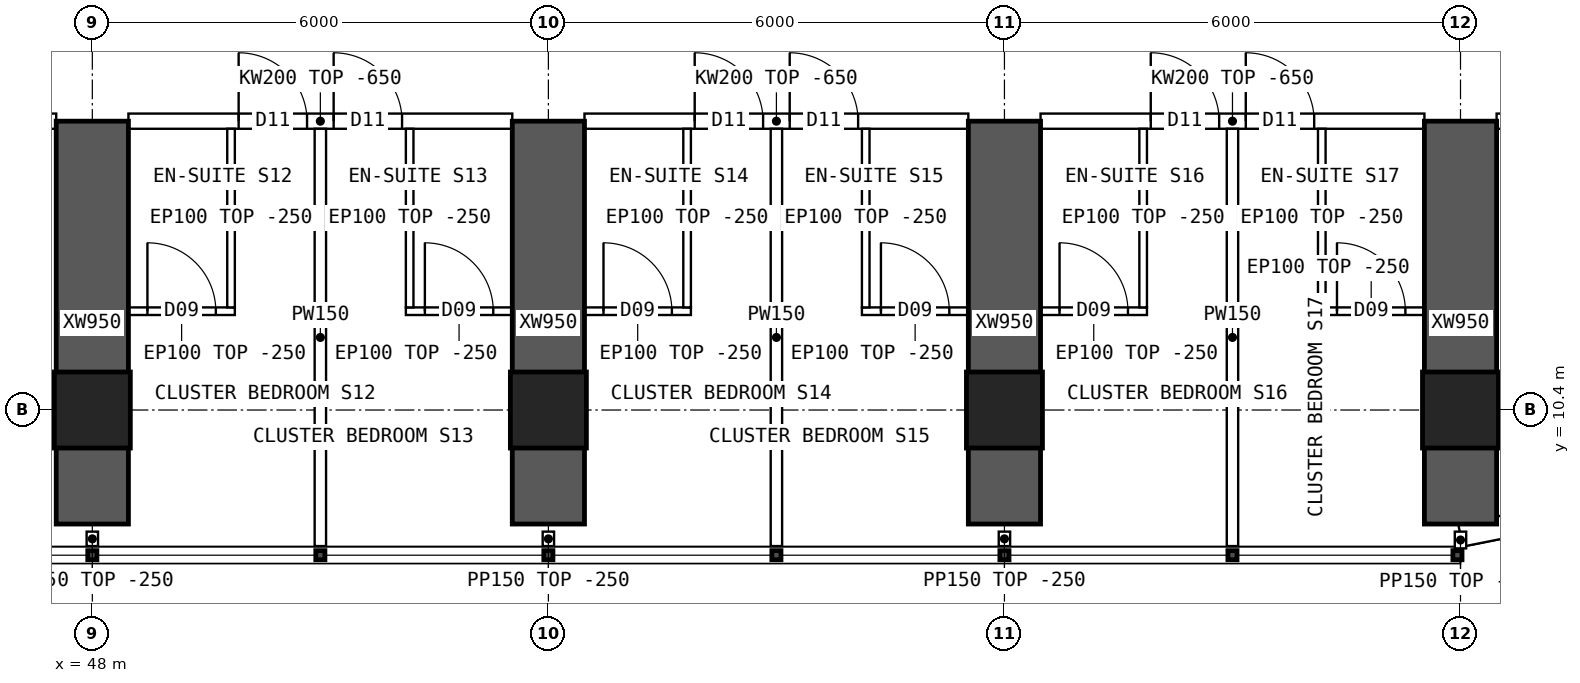
"""IFC4 building model, lengths in metres.
Left out: names, types, materials, properties, quantities, classifications, styles, units other than length and angle.
Written with IfcOpenShell. Run it as: python <this file> out.ifc"""

import sys

from ifc_helpers import new_model, si_unit, direction, frame, frame_2d, origin, origin_2d, place, context, subcontext, project, spatial, polyline, rectangle, hollow_rectangle, outline, extrude, element, fill, save


model = new_model("IFC4")
c1 = context("Model", 3, precision=1e-05, world=origin(), true_north=direction((0.0, 1.0)))
c2 = subcontext(c1, "Body", "Model", "MODEL_VIEW")
j1 = project(units=[si_unit("LENGTHUNIT", "METRE"), si_unit("PLANEANGLEUNIT", "RADIAN")], contexts=[c1])
p1 = place(None, origin())
s1 = spatial("IfcSite", under=j1, at=p1, CompositionType="ELEMENT")
p2 = place(p1, origin())
s2 = spatial("IfcBuilding", under=s1, at=p2, CompositionType="ELEMENT")
p3 = place(p2, frame((0.0, 0.0, 88.15)))
s3 = spatial("IfcBuildingStorey", under=s2, at=p3, CompositionType="ELEMENT", Elevation=88.15)
for number, where, z_axis, x_axis in (
    (1, (48.0, 10.4, 0.0), (0.0, 0.0, 1.0), (1.0, 0.0, 0.0)),
    (2, (54.0, 10.4, 0.0), (0.0, 0.0, 1.0), (1.0, 0.0, 0.0)),
    (3, (60.0, 10.4, 0.0), (0.0, 0.0, 1.0), (1.0, 0.0, 0.0)),
    (4, (66.0, 10.4, 0.0), (0.0, 0.0, 1.0), (1.0, 0.0, 0.0)),
):
    element("IfcColumn", number, at=place(p3, frame(where, z_axis=z_axis, x_axis=x_axis)), inside=s3, PredefinedType="COLUMN", context=c2, shape_type="SweptSolid", body=[
        extrude(hollow_rectangle(XDim=1.0, YDim=1.0, WallThickness=0.1, at=origin_2d()), origin(), (0.0, 0.0, 1.0), 3.75),
    ])
for number, where, z_axis, x_axis in (
    (5, (48.0, 8.9, 0.0), (0.0, 0.0, 1.0), (0.0, 1.0, 0.0)),
    (6, (54.0, 8.9, 0.0), (0.0, 0.0, 1.0), (0.0, 1.0, 0.0)),
    (7, (60.0, 8.9, 0.0), (0.0, 0.0, 1.0), (0.0, 1.0, 0.0)),
    (8, (66.0, 8.9, 0.0), (0.0, 0.0, 1.0), (0.0, 1.0, 0.0)),
):
    element("IfcWall", number, at=place(p3, frame(where, z_axis=z_axis, x_axis=x_axis)), inside=s3, PredefinedType="SHEAR", context=c2, shape_type="SweptSolid", body=[
        extrude(rectangle(XDim=5.3, YDim=0.95, at=frame_2d((2.65, 0.0))), origin(), (0.0, 0.0, 1.0), 3.75),
    ])
p4 = place(p3, frame((66.0, 8.75, 0.0), z_axis=(0.0, 0.0, 1.0), x_axis=(0.980791473772, 0.195059183267, 0.0)))
e9 = element("IfcWall", 9, at=p4, inside=s3, PredefinedType="SOLIDWALL", context=c2, shape_type="SweptSolid", body=[
    extrude(outline(polyline([(-0.03, -0.15), (3.717, -0.15), (3.657, 0.15), (0.03, 0.15), (-0.03, -0.15)])), origin(), (0.0, 0.0, 1.0), 3.5),
])
p5 = place(p4, frame((1.144, 0.0, 0.9)))
e10 = element("IfcOpeningElement", 10, at=p5, cuts=e9, PredefinedType="OPENING", context=c2, shape_type="SweptSolid", body=[
    extrude(rectangle(XDim=1.4, YDim=1.8, at=frame_2d((0.7, 0.9))), frame((0.0, 0.16, 0.0), z_axis=(0.0, -1.0, 0.0), x_axis=(1.0, 0.0, 0.0)), (0.0, 0.0, 1.0), 0.32),
])
p6 = place(p3, frame((42.475, 14.2, 0.0), z_axis=(0.0, 0.0, 1.0), x_axis=(1.0, 0.0, 0.0)))
e11 = element("IfcWall", 11, at=p6, inside=s3, PredefinedType="SOLIDWALL", context=c2, shape_type="SweptSolid", body=[
    extrude(outline(polyline([(0.0, 0.0), (5.05, 0.0), (5.05, 3.1), (0.0, 3.1), (0.0, 0.0)])), frame((0.0, 0.1, 0.0), z_axis=(0.0, -1.0, 0.0), x_axis=(1.0, 0.0, 0.0)), (0.0, 0.0, 1.0), 0.2),
])
p7 = place(p6, frame((0.6, 0.0, 0.0)))
e12 = element("IfcOpeningElement", 12, at=p7, cuts=e11, PredefinedType="OPENING", context=c2, shape_type="SweptSolid", body=[
    extrude(rectangle(XDim=1.0, YDim=2.1, at=frame_2d((0.5, 1.05))), frame((0.0, 0.11, 0.0), z_axis=(0.0, -1.0, 0.0), x_axis=(1.0, 0.0, 0.0)), (0.0, 0.0, 1.0), 0.22),
])
p8 = place(p3, frame((48.475, 14.2, 0.0), z_axis=(0.0, 0.0, 1.0), x_axis=(1.0, 0.0, 0.0)))
e13 = element("IfcWall", 13, at=p8, inside=s3, PredefinedType="SOLIDWALL", context=c2, shape_type="SweptSolid", body=[
    extrude(outline(polyline([(0.0, 0.0), (5.05, 0.0), (5.05, 3.1), (0.0, 3.1), (0.0, 0.0)])), frame((0.0, 0.1, 0.0), z_axis=(0.0, -1.0, 0.0), x_axis=(1.0, 0.0, 0.0)), (0.0, 0.0, 1.0), 0.2),
])
p9 = place(p8, frame((1.45, 0.0, 0.0)))
e14 = element("IfcOpeningElement", 14, at=p9, cuts=e13, PredefinedType="OPENING", context=c2, shape_type="SweptSolid", body=[
    extrude(rectangle(XDim=0.9, YDim=2.1, at=frame_2d((0.45, 1.05))), frame((0.0, 0.11, 0.0), z_axis=(0.0, -1.0, 0.0), x_axis=(1.0, 0.0, 0.0)), (0.0, 0.0, 1.0), 0.22),
])
p10 = place(p8, frame((2.7, 0.0, 0.0)))
e15 = element("IfcOpeningElement", 15, at=p10, cuts=e13, PredefinedType="OPENING", context=c2, shape_type="SweptSolid", body=[
    extrude(rectangle(XDim=0.9, YDim=2.1, at=frame_2d((0.45, 1.05))), frame((0.0, 0.11, 0.0), z_axis=(0.0, -1.0, 0.0), x_axis=(1.0, 0.0, 0.0)), (0.0, 0.0, 1.0), 0.22),
])
p11 = place(p3, frame((54.475, 14.2, 0.0), z_axis=(0.0, 0.0, 1.0), x_axis=(1.0, 0.0, 0.0)))
e16 = element("IfcWall", 16, at=p11, inside=s3, PredefinedType="SOLIDWALL", context=c2, shape_type="SweptSolid", body=[
    extrude(outline(polyline([(0.0, 0.0), (5.05, 0.0), (5.05, 3.1), (0.0, 3.1), (0.0, 0.0)])), frame((0.0, 0.1, 0.0), z_axis=(0.0, -1.0, 0.0), x_axis=(1.0, 0.0, 0.0)), (0.0, 0.0, 1.0), 0.2),
])
p12 = place(p11, frame((1.45, 0.0, 0.0)))
e17 = element("IfcOpeningElement", 17, at=p12, cuts=e16, PredefinedType="OPENING", context=c2, shape_type="SweptSolid", body=[
    extrude(rectangle(XDim=0.9, YDim=2.1, at=frame_2d((0.45, 1.05))), frame((0.0, 0.11, 0.0), z_axis=(0.0, -1.0, 0.0), x_axis=(1.0, 0.0, 0.0)), (0.0, 0.0, 1.0), 0.22),
])
p13 = place(p11, frame((2.7, 0.0, 0.0)))
e18 = element("IfcOpeningElement", 18, at=p13, cuts=e16, PredefinedType="OPENING", context=c2, shape_type="SweptSolid", body=[
    extrude(rectangle(XDim=0.9, YDim=2.1, at=frame_2d((0.45, 1.05))), frame((0.0, 0.11, 0.0), z_axis=(0.0, -1.0, 0.0), x_axis=(1.0, 0.0, 0.0)), (0.0, 0.0, 1.0), 0.22),
])
p14 = place(p3, frame((60.475, 14.2, 0.0), z_axis=(0.0, 0.0, 1.0), x_axis=(1.0, 0.0, 0.0)))
e19 = element("IfcWall", 19, at=p14, inside=s3, PredefinedType="SOLIDWALL", context=c2, shape_type="SweptSolid", body=[
    extrude(outline(polyline([(0.0, 0.0), (5.05, 0.0), (5.05, 3.1), (0.0, 3.1), (0.0, 0.0)])), frame((0.0, 0.1, 0.0), z_axis=(0.0, -1.0, 0.0), x_axis=(1.0, 0.0, 0.0)), (0.0, 0.0, 1.0), 0.2),
])
p15 = place(p14, frame((1.45, 0.0, 0.0)))
e20 = element("IfcOpeningElement", 20, at=p15, cuts=e19, PredefinedType="OPENING", context=c2, shape_type="SweptSolid", body=[
    extrude(rectangle(XDim=0.9, YDim=2.1, at=frame_2d((0.45, 1.05))), frame((0.0, 0.11, 0.0), z_axis=(0.0, -1.0, 0.0), x_axis=(1.0, 0.0, 0.0)), (0.0, 0.0, 1.0), 0.22),
])
p16 = place(p14, frame((2.7, 0.0, 0.0)))
e21 = element("IfcOpeningElement", 21, at=p16, cuts=e19, PredefinedType="OPENING", context=c2, shape_type="SweptSolid", body=[
    extrude(rectangle(XDim=0.9, YDim=2.1, at=frame_2d((0.45, 1.05))), frame((0.0, 0.11, 0.0), z_axis=(0.0, -1.0, 0.0), x_axis=(1.0, 0.0, 0.0)), (0.0, 0.0, 1.0), 0.22),
])
p17 = place(p3, frame((66.475, 14.2, 0.0), z_axis=(0.0, 0.0, 1.0), x_axis=(1.0, 0.0, 0.0)))
e22 = element("IfcWall", 22, at=p17, inside=s3, PredefinedType="SOLIDWALL", context=c2, shape_type="SweptSolid", body=[
    extrude(rectangle(XDim=1.925, YDim=0.2, at=frame_2d((0.962, 0.0))), origin(), (0.0, 0.0, 1.0), 3.5),
])
p18 = place(p17, frame((0.2, 0.0, 0.0)))
e23 = element("IfcOpeningElement", 23, at=p18, cuts=e22, PredefinedType="OPENING", context=c2, shape_type="SweptSolid", body=[
    extrude(rectangle(XDim=0.9, YDim=2.1, at=frame_2d((0.45, 1.05))), frame((0.0, 0.11, 0.0), z_axis=(0.0, -1.0, 0.0), x_axis=(1.0, 0.0, 0.0)), (0.0, 0.0, 1.0), 0.22),
])
p19 = place(p3, frame((51.0, 8.61, 0.0), z_axis=(0.0, 0.0, 1.0), x_axis=(0.0, 1.0, 0.0)))
e24 = element("IfcWall", 24, at=p19, inside=s3, PredefinedType="PARTITIONING", context=c2, shape_type="SweptSolid", body=[
    extrude(outline(polyline([(0.0, 0.0), (5.49, 0.0), (5.49, 3.1), (5.442, 3.1), (5.44, 3.5), (1.992, 3.5), (1.99, 3.1), (1.592, 3.1), (1.59, 3.5), (0.0, 3.5), (0.0, 0.0)])), frame((0.0, 0.075, 0.0), z_axis=(0.0, -1.0, 0.0), x_axis=(1.0, 0.0, 0.0)), (0.0, 0.0, 1.0), 0.15),
])
p20 = place(p3, frame((49.875, 11.7, 0.0), z_axis=(0.0, 0.0, 1.0), x_axis=(-1.0, 0.0, 0.0)))
e25 = element("IfcWall", 25, at=p20, inside=s3, PredefinedType="PARTITIONING", context=c2, shape_type="SweptSolid", body=[
    extrude(rectangle(XDim=1.4, YDim=0.1, at=frame_2d((0.7, 0.0))), origin(), (0.0, 0.0, 1.0), 3.5),
])
p21 = place(p20, frame((0.25, 0.0, 0.0)))
e26 = element("IfcOpeningElement", 26, at=p21, cuts=e25, PredefinedType="OPENING", context=c2, shape_type="SweptSolid", body=[
    extrude(rectangle(XDim=0.9, YDim=2.1, at=frame_2d((0.45, 1.05))), frame((0.0, 0.06, 0.0), z_axis=(0.0, -1.0, 0.0), x_axis=(1.0, 0.0, 0.0)), (0.0, 0.0, 1.0), 0.12),
])
p22 = place(p3, frame((49.825, 11.75, 0.0), z_axis=(0.0, 0.0, 1.0), x_axis=(0.0, 1.0, 0.0)))
e27 = element("IfcWall", 27, at=p22, inside=s3, PredefinedType="PARTITIONING", context=c2, shape_type="SweptSolid", body=[
    extrude(outline(polyline([(0.0, 0.0), (2.35, 0.0), (2.35, 3.1), (2.302, 3.1), (2.3, 3.5), (0.0, 3.5), (0.0, 0.0)])), frame((0.0, 0.05, 0.0), z_axis=(0.0, -1.0, 0.0), x_axis=(1.0, 0.0, 0.0)), (0.0, 0.0, 1.0), 0.1),
])
p23 = place(p3, frame((53.525, 11.7, 0.0), z_axis=(0.0, 0.0, 1.0), x_axis=(-1.0, 0.0, 0.0)))
e28 = element("IfcWall", 28, at=p23, inside=s3, PredefinedType="PARTITIONING", context=c2, shape_type="SweptSolid", body=[
    extrude(rectangle(XDim=1.4, YDim=0.1, at=frame_2d((0.7, 0.0))), origin(), (0.0, 0.0, 1.0), 3.5),
])
p24 = place(p23, frame((0.25, 0.0, 0.0)))
e29 = element("IfcOpeningElement", 29, at=p24, cuts=e28, PredefinedType="OPENING", context=c2, shape_type="SweptSolid", body=[
    extrude(rectangle(XDim=0.9, YDim=2.1, at=frame_2d((0.45, 1.05))), frame((0.0, 0.06, 0.0), z_axis=(0.0, -1.0, 0.0), x_axis=(1.0, 0.0, 0.0)), (0.0, 0.0, 1.0), 0.12),
])
p25 = place(p3, frame((52.175, 11.75, 0.0), z_axis=(0.0, 0.0, 1.0), x_axis=(0.0, 1.0, 0.0)))
e30 = element("IfcWall", 30, at=p25, inside=s3, PredefinedType="PARTITIONING", context=c2, shape_type="SweptSolid", body=[
    extrude(outline(polyline([(0.0, 0.0), (2.35, 0.0), (2.35, 3.1), (2.302, 3.1), (2.3, 3.5), (0.0, 3.5), (0.0, 0.0)])), frame((0.0, 0.05, 0.0), z_axis=(0.0, -1.0, 0.0), x_axis=(1.0, 0.0, 0.0)), (0.0, 0.0, 1.0), 0.1),
])
p26 = place(p3, frame((57.0, 8.61, 0.0), z_axis=(0.0, 0.0, 1.0), x_axis=(0.0, 1.0, 0.0)))
e31 = element("IfcWall", 31, at=p26, inside=s3, PredefinedType="PARTITIONING", context=c2, shape_type="SweptSolid", body=[
    extrude(outline(polyline([(0.0, 0.0), (5.49, 0.0), (5.49, 3.1), (5.442, 3.1), (5.44, 3.5), (1.992, 3.5), (1.99, 3.1), (1.592, 3.1), (1.59, 3.5), (0.0, 3.5), (0.0, 0.0)])), frame((0.0, 0.075, 0.0), z_axis=(0.0, -1.0, 0.0), x_axis=(1.0, 0.0, 0.0)), (0.0, 0.0, 1.0), 0.15),
])
p27 = place(p3, frame((55.875, 11.7, 0.0), z_axis=(0.0, 0.0, 1.0), x_axis=(-1.0, 0.0, 0.0)))
e32 = element("IfcWall", 32, at=p27, inside=s3, PredefinedType="PARTITIONING", context=c2, shape_type="SweptSolid", body=[
    extrude(rectangle(XDim=1.4, YDim=0.1, at=frame_2d((0.7, 0.0))), origin(), (0.0, 0.0, 1.0), 3.5),
])
p28 = place(p27, frame((0.25, 0.0, 0.0)))
e33 = element("IfcOpeningElement", 33, at=p28, cuts=e32, PredefinedType="OPENING", context=c2, shape_type="SweptSolid", body=[
    extrude(rectangle(XDim=0.9, YDim=2.1, at=frame_2d((0.45, 1.05))), frame((0.0, 0.06, 0.0), z_axis=(0.0, -1.0, 0.0), x_axis=(1.0, 0.0, 0.0)), (0.0, 0.0, 1.0), 0.12),
])
p29 = place(p3, frame((55.825, 11.75, 0.0), z_axis=(0.0, 0.0, 1.0), x_axis=(0.0, 1.0, 0.0)))
e34 = element("IfcWall", 34, at=p29, inside=s3, PredefinedType="PARTITIONING", context=c2, shape_type="SweptSolid", body=[
    extrude(outline(polyline([(0.0, 0.0), (2.35, 0.0), (2.35, 3.1), (2.302, 3.1), (2.3, 3.5), (0.0, 3.5), (0.0, 0.0)])), frame((0.0, 0.05, 0.0), z_axis=(0.0, -1.0, 0.0), x_axis=(1.0, 0.0, 0.0)), (0.0, 0.0, 1.0), 0.1),
])
p30 = place(p3, frame((59.525, 11.7, 0.0), z_axis=(0.0, 0.0, 1.0), x_axis=(-1.0, 0.0, 0.0)))
e35 = element("IfcWall", 35, at=p30, inside=s3, PredefinedType="PARTITIONING", context=c2, shape_type="SweptSolid", body=[
    extrude(rectangle(XDim=1.4, YDim=0.1, at=frame_2d((0.7, 0.0))), origin(), (0.0, 0.0, 1.0), 3.5),
])
p31 = place(p30, frame((0.25, 0.0, 0.0)))
e36 = element("IfcOpeningElement", 36, at=p31, cuts=e35, PredefinedType="OPENING", context=c2, shape_type="SweptSolid", body=[
    extrude(rectangle(XDim=0.9, YDim=2.1, at=frame_2d((0.45, 1.05))), frame((0.0, 0.06, 0.0), z_axis=(0.0, -1.0, 0.0), x_axis=(1.0, 0.0, 0.0)), (0.0, 0.0, 1.0), 0.12),
])
p32 = place(p3, frame((58.175, 11.75, 0.0), z_axis=(0.0, 0.0, 1.0), x_axis=(0.0, 1.0, 0.0)))
e37 = element("IfcWall", 37, at=p32, inside=s3, PredefinedType="PARTITIONING", context=c2, shape_type="SweptSolid", body=[
    extrude(outline(polyline([(0.0, 0.0), (2.35, 0.0), (2.35, 3.1), (2.302, 3.1), (2.3, 3.5), (0.0, 3.5), (0.0, 0.0)])), frame((0.0, 0.05, 0.0), z_axis=(0.0, -1.0, 0.0), x_axis=(1.0, 0.0, 0.0)), (0.0, 0.0, 1.0), 0.1),
])
p33 = place(p3, frame((63.0, 8.61, 0.0), z_axis=(0.0, 0.0, 1.0), x_axis=(0.0, 1.0, 0.0)))
e38 = element("IfcWall", 38, at=p33, inside=s3, PredefinedType="PARTITIONING", context=c2, shape_type="SweptSolid", body=[
    extrude(outline(polyline([(0.0, 0.0), (5.49, 0.0), (5.49, 3.1), (5.442, 3.1), (5.44, 3.5), (1.992, 3.5), (1.99, 3.1), (1.592, 3.1), (1.59, 3.5), (0.0, 3.5), (0.0, 0.0)])), frame((0.0, 0.075, 0.0), z_axis=(0.0, -1.0, 0.0), x_axis=(1.0, 0.0, 0.0)), (0.0, 0.0, 1.0), 0.15),
])
p34 = place(p3, frame((61.875, 11.7, 0.0), z_axis=(0.0, 0.0, 1.0), x_axis=(-1.0, 0.0, 0.0)))
e39 = element("IfcWall", 39, at=p34, inside=s3, PredefinedType="PARTITIONING", context=c2, shape_type="SweptSolid", body=[
    extrude(rectangle(XDim=1.4, YDim=0.1, at=frame_2d((0.7, 0.0))), origin(), (0.0, 0.0, 1.0), 3.5),
])
p35 = place(p34, frame((0.25, 0.0, 0.0)))
e40 = element("IfcOpeningElement", 40, at=p35, cuts=e39, PredefinedType="OPENING", context=c2, shape_type="SweptSolid", body=[
    extrude(rectangle(XDim=0.9, YDim=2.1, at=frame_2d((0.45, 1.05))), frame((0.0, 0.06, 0.0), z_axis=(0.0, -1.0, 0.0), x_axis=(1.0, 0.0, 0.0)), (0.0, 0.0, 1.0), 0.12),
])
p36 = place(p3, frame((61.825, 11.75, 0.0), z_axis=(0.0, 0.0, 1.0), x_axis=(0.0, 1.0, 0.0)))
e41 = element("IfcWall", 41, at=p36, inside=s3, PredefinedType="PARTITIONING", context=c2, shape_type="SweptSolid", body=[
    extrude(outline(polyline([(0.0, 0.0), (2.35, 0.0), (2.35, 3.1), (2.302, 3.1), (2.3, 3.5), (0.0, 3.5), (0.0, 0.0)])), frame((0.0, 0.05, 0.0), z_axis=(0.0, -1.0, 0.0), x_axis=(1.0, 0.0, 0.0)), (0.0, 0.0, 1.0), 0.1),
])
p37 = place(p3, frame((65.525, 11.7, 0.0), z_axis=(0.0, 0.0, 1.0), x_axis=(-1.0, 0.0, 0.0)))
e42 = element("IfcWall", 42, at=p37, inside=s3, PredefinedType="PARTITIONING", context=c2, shape_type="SweptSolid", body=[
    extrude(rectangle(XDim=1.4, YDim=0.1, at=frame_2d((0.7, 0.0))), origin(), (0.0, 0.0, 1.0), 3.5),
])
p38 = place(p37, frame((0.25, 0.0, 0.0)))
e43 = element("IfcOpeningElement", 43, at=p38, cuts=e42, PredefinedType="OPENING", context=c2, shape_type="SweptSolid", body=[
    extrude(rectangle(XDim=0.9, YDim=2.1, at=frame_2d((0.45, 1.05))), frame((0.0, 0.06, 0.0), z_axis=(0.0, -1.0, 0.0), x_axis=(1.0, 0.0, 0.0)), (0.0, 0.0, 1.0), 0.12),
])
p39 = place(p3, frame((64.175, 11.75, 0.0), z_axis=(0.0, 0.0, 1.0), x_axis=(0.0, 1.0, 0.0)))
e44 = element("IfcWall", 44, at=p39, inside=s3, PredefinedType="PARTITIONING", context=c2, shape_type="SweptSolid", body=[
    extrude(outline(polyline([(0.0, 0.0), (2.35, 0.0), (2.35, 3.1), (2.302, 3.1), (2.3, 3.5), (0.0, 3.5), (0.0, 0.0)])), frame((0.0, 0.05, 0.0), z_axis=(0.0, -1.0, 0.0), x_axis=(1.0, 0.0, 0.0)), (0.0, 0.0, 1.0), 0.1),
])
for number, where, z_axis, x_axis in (
    (45, (48.0, 8.8, 0.0), (0.0, 0.0, 1.0), (0.0, -1.0, 0.0)),
    (46, (54.0, 8.8, 0.0), (0.0, 0.0, 1.0), (0.0, -1.0, 0.0)),
    (47, (60.0, 8.8, 0.0), (0.0, 0.0, 1.0), (0.0, -1.0, 0.0)),
):
    element("IfcWall", number, at=place(p3, frame(where, z_axis=z_axis, x_axis=x_axis)), inside=s3, PredefinedType="PARTITIONING", context=c2, shape_type="SweptSolid", body=[
        extrude(rectangle(XDim=0.19, YDim=0.15, at=frame_2d((0.095, 0.0))), origin(), (0.0, 0.0, 1.0), 3.5),
    ])
p40 = place(p3, frame((66.0, 8.8, 0.0), z_axis=(0.0, 0.0, 1.0), x_axis=(0.0, -1.0, 0.0)))
e48 = element("IfcWall", 48, at=p40, inside=s3, PredefinedType="PARTITIONING", context=c2, shape_type="SweptSolid", body=[
    extrude(rectangle(XDim=0.22, YDim=0.15, at=frame_2d((0.11, 0.0))), origin(), (0.0, 0.0, 1.0), 3.5),
])
p41 = place(p21, origin())
e49 = element("IfcDoor", 49, at=p41, inside=s3, OperationType="SINGLE_SWING_RIGHT", PredefinedType="DOOR", context=c2, shape_type="SweptSolid", body=[
    extrude(rectangle(XDim=0.9, YDim=2.1, at=frame_2d((0.45, 1.05))), frame((0.0, 0.025, 0.0), z_axis=(0.0, -1.0, 0.0), x_axis=(1.0, 0.0, 0.0)), (0.0, 0.0, 1.0), 0.05),
])
fill(e26, e49)
p42 = place(p9, origin())
e50 = element("IfcDoor", 50, at=p42, inside=s3, OperationType="SINGLE_SWING_LEFT", PredefinedType="DOOR", context=c2, shape_type="SweptSolid", body=[
    extrude(rectangle(XDim=0.9, YDim=2.1, at=frame_2d((0.45, 1.05))), frame((0.0, 0.025, 0.0), z_axis=(0.0, -1.0, 0.0), x_axis=(1.0, 0.0, 0.0)), (0.0, 0.0, 1.0), 0.05),
])
fill(e14, e50)
p43 = place(p24, origin())
e51 = element("IfcDoor", 51, at=p43, inside=s3, OperationType="SINGLE_SWING_RIGHT", PredefinedType="DOOR", context=c2, shape_type="SweptSolid", body=[
    extrude(rectangle(XDim=0.9, YDim=2.1, at=frame_2d((0.45, 1.05))), frame((0.0, 0.025, 0.0), z_axis=(0.0, -1.0, 0.0), x_axis=(1.0, 0.0, 0.0)), (0.0, 0.0, 1.0), 0.05),
])
fill(e29, e51)
p44 = place(p10, origin())
e52 = element("IfcDoor", 52, at=p44, inside=s3, OperationType="SINGLE_SWING_LEFT", PredefinedType="DOOR", context=c2, shape_type="SweptSolid", body=[
    extrude(rectangle(XDim=0.9, YDim=2.1, at=frame_2d((0.45, 1.05))), frame((0.0, 0.025, 0.0), z_axis=(0.0, -1.0, 0.0), x_axis=(1.0, 0.0, 0.0)), (0.0, 0.0, 1.0), 0.05),
])
fill(e15, e52)
p45 = place(p28, origin())
e53 = element("IfcDoor", 53, at=p45, inside=s3, OperationType="SINGLE_SWING_RIGHT", PredefinedType="DOOR", context=c2, shape_type="SweptSolid", body=[
    extrude(rectangle(XDim=0.9, YDim=2.1, at=frame_2d((0.45, 1.05))), frame((0.0, 0.025, 0.0), z_axis=(0.0, -1.0, 0.0), x_axis=(1.0, 0.0, 0.0)), (0.0, 0.0, 1.0), 0.05),
])
fill(e33, e53)
p46 = place(p12, origin())
e54 = element("IfcDoor", 54, at=p46, inside=s3, OperationType="SINGLE_SWING_LEFT", PredefinedType="DOOR", context=c2, shape_type="SweptSolid", body=[
    extrude(rectangle(XDim=0.9, YDim=2.1, at=frame_2d((0.45, 1.05))), frame((0.0, 0.025, 0.0), z_axis=(0.0, -1.0, 0.0), x_axis=(1.0, 0.0, 0.0)), (0.0, 0.0, 1.0), 0.05),
])
fill(e17, e54)
p47 = place(p31, origin())
e55 = element("IfcDoor", 55, at=p47, inside=s3, OperationType="SINGLE_SWING_RIGHT", PredefinedType="DOOR", context=c2, shape_type="SweptSolid", body=[
    extrude(rectangle(XDim=0.9, YDim=2.1, at=frame_2d((0.45, 1.05))), frame((0.0, 0.025, 0.0), z_axis=(0.0, -1.0, 0.0), x_axis=(1.0, 0.0, 0.0)), (0.0, 0.0, 1.0), 0.05),
])
fill(e36, e55)
p48 = place(p13, origin())
e56 = element("IfcDoor", 56, at=p48, inside=s3, OperationType="SINGLE_SWING_LEFT", PredefinedType="DOOR", context=c2, shape_type="SweptSolid", body=[
    extrude(rectangle(XDim=0.9, YDim=2.1, at=frame_2d((0.45, 1.05))), frame((0.0, 0.025, 0.0), z_axis=(0.0, -1.0, 0.0), x_axis=(1.0, 0.0, 0.0)), (0.0, 0.0, 1.0), 0.05),
])
fill(e18, e56)
p49 = place(p35, origin())
e57 = element("IfcDoor", 57, at=p49, inside=s3, OperationType="SINGLE_SWING_RIGHT", PredefinedType="DOOR", context=c2, shape_type="SweptSolid", body=[
    extrude(rectangle(XDim=0.9, YDim=2.1, at=frame_2d((0.45, 1.05))), frame((0.0, 0.025, 0.0), z_axis=(0.0, -1.0, 0.0), x_axis=(1.0, 0.0, 0.0)), (0.0, 0.0, 1.0), 0.05),
])
fill(e40, e57)
p50 = place(p15, origin())
e58 = element("IfcDoor", 58, at=p50, inside=s3, OperationType="SINGLE_SWING_LEFT", PredefinedType="DOOR", context=c2, shape_type="SweptSolid", body=[
    extrude(rectangle(XDim=0.9, YDim=2.1, at=frame_2d((0.45, 1.05))), frame((0.0, 0.025, 0.0), z_axis=(0.0, -1.0, 0.0), x_axis=(1.0, 0.0, 0.0)), (0.0, 0.0, 1.0), 0.05),
])
fill(e20, e58)
p51 = place(p38, origin())
e59 = element("IfcDoor", 59, at=p51, inside=s3, OperationType="SINGLE_SWING_RIGHT", PredefinedType="DOOR", context=c2, shape_type="SweptSolid", body=[
    extrude(rectangle(XDim=0.9, YDim=2.1, at=frame_2d((0.45, 1.05))), frame((0.0, 0.025, 0.0), z_axis=(0.0, -1.0, 0.0), x_axis=(1.0, 0.0, 0.0)), (0.0, 0.0, 1.0), 0.05),
])
fill(e43, e59)
p52 = place(p16, origin())
e60 = element("IfcDoor", 60, at=p52, inside=s3, OperationType="SINGLE_SWING_LEFT", PredefinedType="DOOR", context=c2, shape_type="SweptSolid", body=[
    extrude(rectangle(XDim=0.9, YDim=2.1, at=frame_2d((0.45, 1.05))), frame((0.0, 0.025, 0.0), z_axis=(0.0, -1.0, 0.0), x_axis=(1.0, 0.0, 0.0)), (0.0, 0.0, 1.0), 0.05),
])
fill(e21, e60)
save(model, sys.argv[1])
